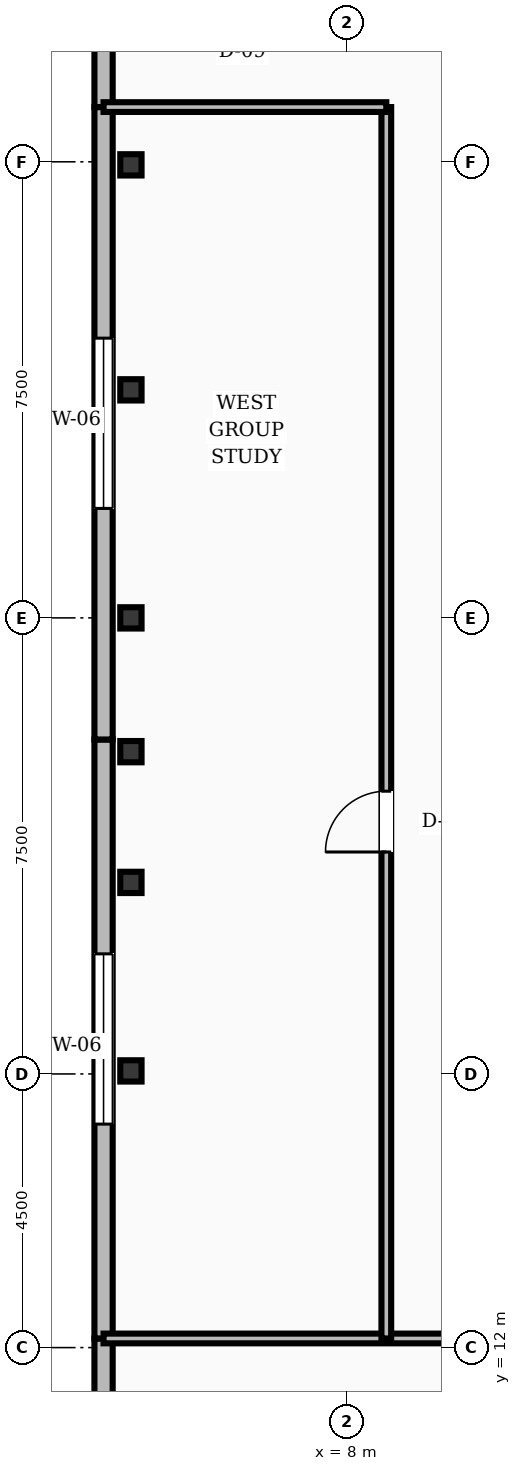
"""IFC4 building model, lengths in metres.
Left out: names, types, materials, properties, quantities, classifications, styles, units other than length and angle.
Written with IfcOpenShell. Run it as: python <this file> out.ifc"""

import sys

from ifc_helpers import new_model, si_unit, direction, frame, frame_2d, origin, origin_2d, place, context, subcontext, project, spatial, rectangle, hollow_rectangle, i_section, extrude, element, fill, save


model = new_model("IFC4")
c1 = context("Model", 3, precision=1e-05, world=origin(), true_north=direction((0.0, 1.0)))
c2 = subcontext(c1, "Body", "Model", "MODEL_VIEW")
j1 = project(units=[si_unit("LENGTHUNIT", "METRE"), si_unit("PLANEANGLEUNIT", "RADIAN")], contexts=[c1])
p1 = place(None, origin())
s1 = spatial("IfcSite", under=j1, at=p1, CompositionType="ELEMENT")
p2 = place(p1, origin())
s2 = spatial("IfcBuilding", under=s1, at=p2, CompositionType="ELEMENT")
p3 = place(p2, frame((0.0, 0.0, 14.8)))
s3 = spatial("IfcBuildingStorey", under=s2, at=p3, CompositionType="ELEMENT", Elevation=14.8)
for number, where, z_axis, x_axis in (
    (1, (4.45, 16.55, 0.0), (0.0, 0.0, 1.0), (1.0, 0.0, 0.0)),
    (2, (4.45, 19.65, 0.0), (0.0, 0.0, 1.0), (1.0, 0.0, 0.0)),
    (3, (4.45, 24.0, 0.0), (0.0, 0.0, 1.0), (1.0, 0.0, 0.0)),
    (4, (4.45, 27.75, 0.0), (0.0, 0.0, 1.0), (1.0, 0.0, 0.0)),
    (5, (4.45, 31.45, 0.0), (0.0, 0.0, 1.0), (1.0, 0.0, 0.0)),
):
    element("IfcColumn", number, at=place(p3, frame(where, z_axis=z_axis, x_axis=x_axis)), inside=s3, PredefinedType="COLUMN", context=c2, shape_type="SweptSolid", body=[
        extrude(i_section(OverallWidth=0.35, OverallDepth=0.35, WebThickness=0.012, FlangeThickness=0.019, FilletRadius=0.016, at=origin_2d()), origin(), (0.0, 0.0, 1.0), 4.8),
    ])
p4 = place(p3, frame((4.45, 21.8, 0.0), z_axis=(0.0, 0.0, 1.0), x_axis=(1.0, 0.0, 0.0)))
e6 = element("IfcColumn", 6, at=p4, inside=s3, PredefinedType="PILASTER", context=c2, shape_type="SweptSolid", body=[
    extrude(hollow_rectangle(XDim=0.35, YDim=0.35, WallThickness=0.016, at=origin_2d()), origin(), (0.0, 0.0, 1.0), 4.8),
])
p5 = place(p3, frame((4.0, 12.15, 0.0), z_axis=(0.0, 0.0, 1.0), x_axis=(0.0, -1.0, 0.0)))
e7 = element("IfcWall", 7, at=p5, inside=s3, PredefinedType="STANDARD", context=c2, shape_type="SweptSolid", body=[
    extrude(rectangle(XDim=9.15, YDim=0.3, at=frame_2d((4.575, 0.0))), origin(), (0.0, 0.0, 1.0), 3.57),
])
p6 = place(p5, frame((3.175, 0.0, 0.85)))
e8 = element("IfcOpeningElement", 8, at=p6, cuts=e7, PredefinedType="OPENING", context=c2, shape_type="SweptSolid", body=[
    extrude(rectangle(XDim=2.8, YDim=2.3, at=frame_2d((1.4, 1.15))), frame((0.0, 0.16, 0.0), z_axis=(0.0, -1.0, 0.0), x_axis=(1.0, 0.0, 0.0)), (0.0, 0.0, 1.0), 0.32),
])
p7 = place(p3, frame((4.0, 22.0, 0.0), z_axis=(0.0, 0.0, 1.0), x_axis=(0.0, -1.0, 0.0)))
e9 = element("IfcWall", 9, at=p7, inside=s3, PredefinedType="STANDARD", context=c2, shape_type="SweptSolid", body=[
    extrude(rectangle(XDim=9.85, YDim=0.3, at=frame_2d((4.925, 0.0))), origin(), (0.0, 0.0, 1.0), 3.57),
])
p8 = place(p7, frame((3.525, 0.0, 0.85)))
e10 = element("IfcOpeningElement", 10, at=p8, cuts=e9, PredefinedType="OPENING", context=c2, shape_type="SweptSolid", body=[
    extrude(rectangle(XDim=2.8, YDim=2.3, at=frame_2d((1.4, 1.15))), frame((0.0, 0.16, 0.0), z_axis=(0.0, -1.0, 0.0), x_axis=(1.0, 0.0, 0.0)), (0.0, 0.0, 1.0), 0.32),
])
p9 = place(p3, frame((4.0, 32.4, 0.0), z_axis=(0.0, 0.0, 1.0), x_axis=(0.0, -1.0, 0.0)))
e11 = element("IfcWall", 11, at=p9, inside=s3, PredefinedType="STANDARD", context=c2, shape_type="SweptSolid", body=[
    extrude(rectangle(XDim=10.4, YDim=0.3, at=frame_2d((5.2, 0.0))), origin(), (0.0, 0.0, 1.0), 3.57),
])
p10 = place(p9, frame((3.8, 0.0, 0.85)))
e12 = element("IfcOpeningElement", 12, at=p10, cuts=e11, PredefinedType="OPENING", context=c2, shape_type="SweptSolid", body=[
    extrude(rectangle(XDim=2.8, YDim=2.3, at=frame_2d((1.4, 1.15))), frame((0.0, 0.16, 0.0), z_axis=(0.0, -1.0, 0.0), x_axis=(1.0, 0.0, 0.0)), (0.0, 0.0, 1.0), 0.32),
])
p11 = place(p3, frame((4.0, 34.28, 0.0), z_axis=(0.0, 0.0, 1.0), x_axis=(0.0, -1.0, 0.0)))
e13 = element("IfcWall", 13, at=p11, inside=s3, PredefinedType="STANDARD", context=c2, shape_type="SweptSolid", body=[
    extrude(rectangle(XDim=1.88, YDim=0.3, at=frame_2d((0.94, 0.0))), origin(), (0.0, 0.0, 1.0), 3.57),
])
p12 = place(p3, frame((4.0, 12.15, 0.0), z_axis=(0.0, 0.0, 1.0), x_axis=(1.0, 0.0, 0.0)))
e14 = element("IfcWall", 14, at=p12, inside=s3, PredefinedType="SOLIDWALL", context=c2, shape_type="SweptSolid", body=[
    extrude(rectangle(XDim=51.35, YDim=0.16, at=frame_2d((25.675, 0.0))), origin(), (0.0, 0.0, 1.0), 3.52),
])
p13 = place(p12, frame((12.0, 0.0, 0.0)))
e15 = element("IfcOpeningElement", 15, at=p13, cuts=e14, PredefinedType="OPENING", context=c2, shape_type="SweptSolid", body=[
    extrude(rectangle(XDim=1.4, YDim=2.15, at=frame_2d((0.7, 1.075))), frame((0.0, 0.09, 0.0), z_axis=(0.0, -1.0, 0.0), x_axis=(1.0, 0.0, 0.0)), (0.0, 0.0, 1.0), 0.18),
])
p14 = place(p12, frame((38.0, 0.0, 0.0)))
e16 = element("IfcOpeningElement", 16, at=p14, cuts=e14, PredefinedType="OPENING", context=c2, shape_type="SweptSolid", body=[
    extrude(rectangle(XDim=1.2, YDim=2.1, at=frame_2d((0.6, 1.05))), frame((0.0, 0.09, 0.0), z_axis=(0.0, -1.0, 0.0), x_axis=(1.0, 0.0, 0.0)), (0.0, 0.0, 1.0), 0.18),
])
p15 = place(p3, frame((8.65, 12.15, 0.0), z_axis=(0.0, 0.0, 1.0), x_axis=(0.0, 1.0, 0.0)))
e17 = element("IfcWall", 17, at=p15, inside=s3, PredefinedType="SOLIDWALL", context=c2, shape_type="SweptSolid", body=[
    extrude(rectangle(XDim=20.25, YDim=0.16, at=frame_2d((10.125, 0.0))), origin(), (0.0, 0.0, 1.0), 3.52),
])
p16 = place(p15, frame((8.0, 0.0, 0.0)))
e18 = element("IfcOpeningElement", 18, at=p16, cuts=e17, PredefinedType="OPENING", context=c2, shape_type="SweptSolid", body=[
    extrude(rectangle(XDim=1.0, YDim=2.1, at=frame_2d((0.5, 1.05))), frame((0.0, 0.09, 0.0), z_axis=(0.0, -1.0, 0.0), x_axis=(1.0, 0.0, 0.0)), (0.0, 0.0, 1.0), 0.18),
])
p17 = place(p3, frame((4.0, 32.4, 0.0), z_axis=(0.0, 0.0, 1.0), x_axis=(1.0, 0.0, 0.0)))
e19 = element("IfcWall", 19, at=p17, inside=s3, PredefinedType="SOLIDWALL", context=c2, shape_type="SweptSolid", body=[
    extrude(rectangle(XDim=4.65, YDim=0.16, at=frame_2d((2.325, 0.0))), origin(), (0.0, 0.0, 1.0), 3.52),
])
p18 = place(p8, origin())
e20 = element("IfcWindow", 20, at=p18, inside=s3, PartitioningType="SINGLE_PANEL", PredefinedType="WINDOW", context=c2, shape_type="SweptSolid", body=[
    extrude(rectangle(XDim=2.8, YDim=2.3, at=frame_2d((1.4, 1.15))), frame((0.0, 0.03, 0.0), z_axis=(0.0, -1.0, 0.0), x_axis=(1.0, 0.0, 0.0)), (0.0, 0.0, 1.0), 0.06),
])
fill(e10, e20)
p19 = place(p10, origin())
e21 = element("IfcWindow", 21, at=p19, inside=s3, PartitioningType="SINGLE_PANEL", PredefinedType="WINDOW", context=c2, shape_type="SweptSolid", body=[
    extrude(rectangle(XDim=2.8, YDim=2.3, at=frame_2d((1.4, 1.15))), frame((0.0, 0.03, 0.0), z_axis=(0.0, -1.0, 0.0), x_axis=(1.0, 0.0, 0.0)), (0.0, 0.0, 1.0), 0.06),
])
fill(e12, e21)
p20 = place(p16, origin())
e22 = element("IfcDoor", 22, at=p20, inside=s3, OperationType="SINGLE_SWING_LEFT", PredefinedType="DOOR", context=c2, shape_type="SweptSolid", body=[
    extrude(rectangle(XDim=1.0, YDim=2.1, at=frame_2d((0.5, 1.05))), frame((0.0, 0.025, 0.0), z_axis=(0.0, -1.0, 0.0), x_axis=(1.0, 0.0, 0.0)), (0.0, 0.0, 1.0), 0.05),
])
fill(e18, e22)
save(model, sys.argv[1])
